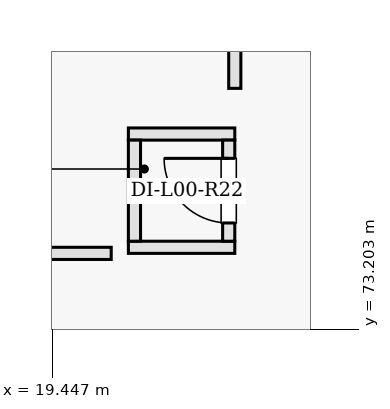
"""IFC4 building model, lengths in metres.
Left out: names, types, materials, properties, quantities, classifications, styles, units other than length and angle.
Written with IfcOpenShell. Run it as: python <this file> out.ifc"""

import sys

from ifc_helpers import new_model, si_unit, direction, frame, frame_2d, origin, place, context, subcontext, project, spatial, rectangle, extrude, element, fill, save


model = new_model("IFC4")
c1 = context("Model", 3, precision=1e-05, world=origin(), true_north=direction((0.0, 1.0)))
c2 = subcontext(c1, "Body", "Model", "MODEL_VIEW")
j1 = project(units=[si_unit("LENGTHUNIT", "METRE"), si_unit("PLANEANGLEUNIT", "RADIAN")], contexts=[c1])
p1 = place(None, origin())
s1 = spatial("IfcSite", under=j1, at=p1, CompositionType="ELEMENT")
p2 = place(p1, origin())
s2 = spatial("IfcBuilding", under=s1, at=p2, CompositionType="ELEMENT")
p3 = place(p2, origin())
s3 = spatial("IfcBuildingStorey", under=s2, at=p3, CompositionType="ELEMENT", Elevation=0.0)
for number, where, z_axis, x_axis in (
    (1, (20.45, 74.28, 0.0), (0.0, 0.0, 1.0), (1.0, 0.0, 0.0)),
    (2, (20.45, 75.77, 0.0), (0.0, 0.0, 1.0), (1.0, 0.0, 0.0)),
):
    element("IfcWall", number, at=place(p3, frame(where, z_axis=z_axis, x_axis=x_axis)), inside=s3, PredefinedType="PARTITIONING", context=c2, shape_type="SweptSolid", body=[
        extrude(rectangle(XDim=1.4, YDim=0.16, at=frame_2d((0.7, 0.0))), origin(), (0.0, 0.0, 1.0), 4.52),
    ])
p4 = place(p3, frame((20.53, 74.36, 0.0), z_axis=(0.0, 0.0, 1.0), x_axis=(0.0, 1.0, 0.0)))
e3 = element("IfcWall", 3, at=p4, inside=s3, PredefinedType="PARTITIONING", context=c2, shape_type="SweptSolid", body=[
    extrude(rectangle(XDim=1.33, YDim=0.16, at=frame_2d((0.665, 0.0))), origin(), (0.0, 0.0, 1.0), 4.52),
])
p5 = place(p3, frame((21.77, 74.36, 0.0), z_axis=(0.0, 0.0, 1.0), x_axis=(0.0, 1.0, 0.0)))
e4 = element("IfcWall", 4, at=p5, inside=s3, PredefinedType="PARTITIONING", context=c2, shape_type="SweptSolid", body=[
    extrude(rectangle(XDim=1.33, YDim=0.16, at=frame_2d((0.665, 0.0))), origin(), (0.0, 0.0, 1.0), 4.52),
])
p6 = place(p5, frame((0.24, 0.0, 0.0)))
e5 = element("IfcOpeningElement", 5, at=p6, cuts=e4, PredefinedType="OPENING", context=c2, shape_type="SweptSolid", body=[
    extrude(rectangle(XDim=0.85, YDim=2.02, at=frame_2d((0.425, 1.01))), frame((0.0, 0.09, 0.0), z_axis=(0.0, -1.0, 0.0), x_axis=(1.0, 0.0, 0.0)), (0.0, 0.0, 1.0), 0.18),
])
p7 = place(p3, frame((17.37, 74.2, 0.0), z_axis=(0.0, 0.0, 1.0), x_axis=(1.0, 0.0, 0.0)))
e6 = element("IfcWall", 6, at=p7, inside=s3, PredefinedType="PARTITIONING", context=c2, shape_type="SweptSolid", body=[
    extrude(rectangle(XDim=2.854, YDim=0.16, at=frame_2d((1.427, 0.0))), origin(), (0.0, 0.0, 1.0), 4.52),
])
p8 = place(p3, frame((21.85, 76.371, 0.0), z_axis=(0.0, 0.0, 1.0), x_axis=(0.0, 1.0, 0.0)))
e7 = element("IfcWall", 7, at=p8, inside=s3, PredefinedType="PARTITIONING", context=c2, shape_type="SweptSolid", body=[
    extrude(rectangle(XDim=3.839, YDim=0.16, at=frame_2d((1.919, 0.0))), origin(), (0.0, 0.0, 1.0), 3.805),
])
p9 = place(p6, origin())
e8 = element("IfcDoor", 8, at=p9, inside=s3, OperationType="SINGLE_SWING_RIGHT", PredefinedType="DOOR", context=c2, shape_type="SweptSolid", body=[
    extrude(rectangle(XDim=0.85, YDim=2.02, at=frame_2d((0.425, 1.01))), frame((0.0, 0.025, 0.0), z_axis=(0.0, -1.0, 0.0), x_axis=(1.0, 0.0, 0.0)), (0.0, 0.0, 1.0), 0.05),
])
fill(e5, e8)
save(model, sys.argv[1])
